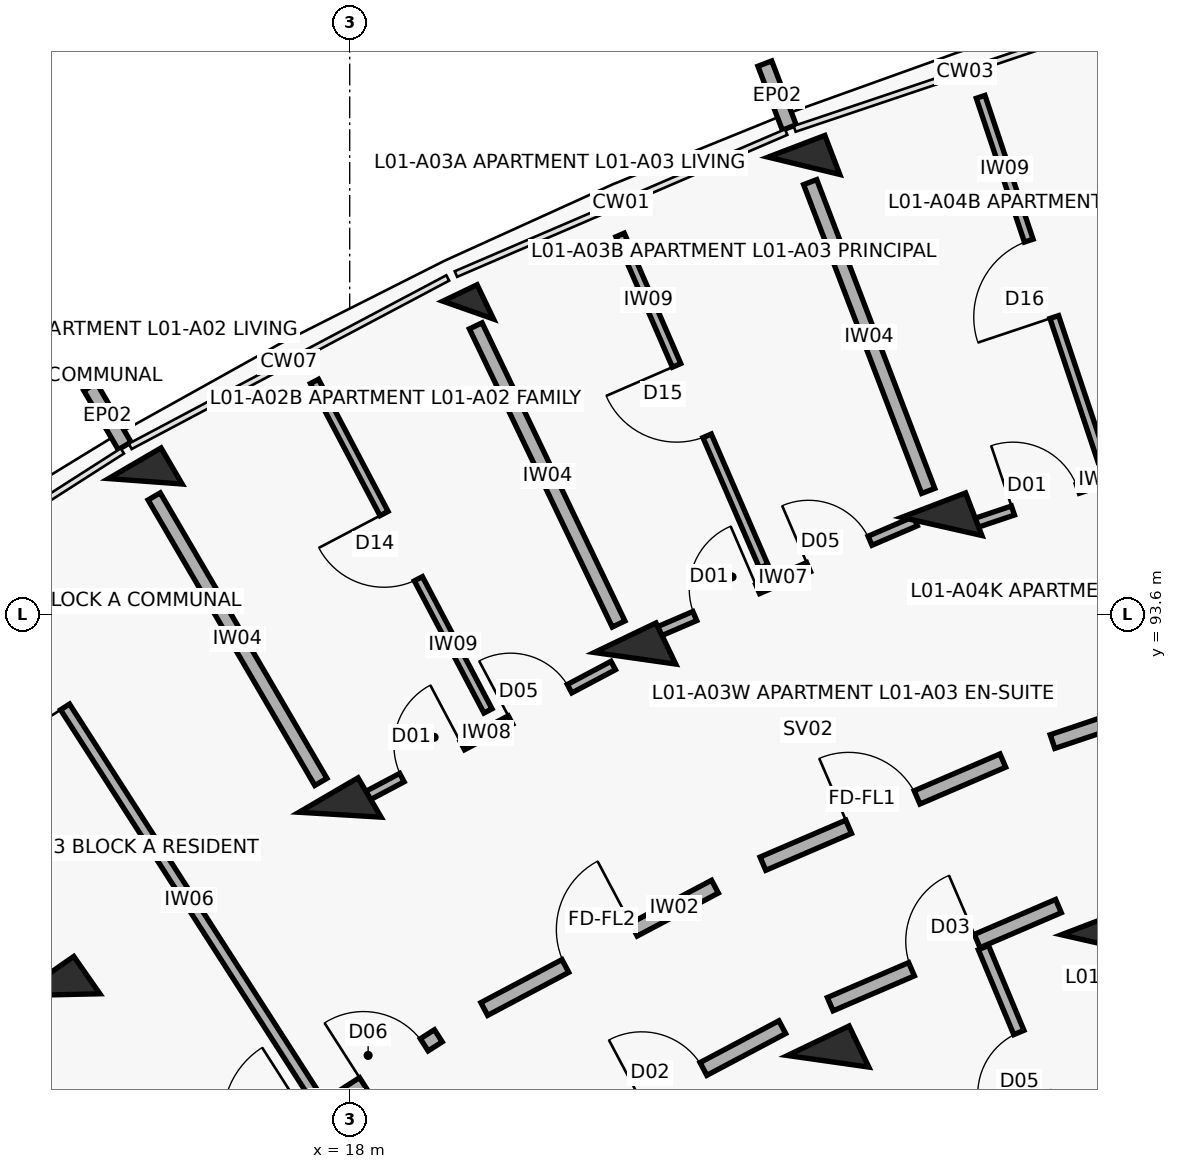
"""IFC4 building model, lengths in metres.
Left out: names, types, materials, properties, quantities, classifications, styles, units other than length and angle.
Written with IfcOpenShell. Run it as: python <this file> out.ifc"""

import sys

from ifc_helpers import new_model, si_unit, direction, frame, frame_2d, origin, origin_2d, place, context, subcontext, project, spatial, rectangle, extrude, element, fill, save


model = new_model("IFC4")
c1 = context("Model", 3, precision=1e-05, world=origin(), true_north=direction((0.0, 1.0)))
c2 = subcontext(c1, "Body", "Model", "MODEL_VIEW")
j1 = project(units=[si_unit("LENGTHUNIT", "METRE"), si_unit("PLANEANGLEUNIT", "RADIAN")], contexts=[c1])
p1 = place(None, origin())
s1 = spatial("IfcSite", under=j1, at=p1, CompositionType="ELEMENT")
p2 = place(p1, origin())
s2 = spatial("IfcBuilding", under=s1, at=p2, CompositionType="ELEMENT")
p3 = place(p2, frame((0.0, 0.0, 4.5)))
s3 = spatial("IfcBuildingStorey", under=s2, at=p3, CompositionType="ELEMENT", Elevation=4.5)
for number, where, z_axis, x_axis in (
    (1, (14.172, 88.592, 0.0), (0.0, 0.0, 1.0), (-0.573, 0.82, 0.0)),
    (2, (17.873, 90.96, 0.0), (0.0, 0.0, 1.0), (-0.504, 0.864, 0.0)),
):
    element("IfcColumn", number, at=place(p3, frame(where, z_axis=z_axis, x_axis=x_axis)), inside=s3, PredefinedType="COLUMN", context=c2, shape_type="SweptSolid", body=[
        extrude(rectangle(XDim=0.6, YDim=0.9, at=origin_2d()), origin(), (0.0, 0.0, 1.0), 3.6),
    ])
p4 = place(p3, frame((15.311, 95.347, 0.0), z_axis=(0.0, 0.0, 1.0), x_axis=(-0.504226211181, 0.863571611366, 0.0)))
e3 = element("IfcColumn", 3, at=p4, inside=s3, PredefinedType="COLUMN", context=c2, shape_type="SweptSolid", body=[
    extrude(rectangle(XDim=0.55, YDim=0.8, at=origin_2d()), origin(), (0.0, 0.0, 1.0), 3.6),
])
for number, where, z_axis, x_axis in (
    (4, (24.294, 87.716, 0.0), (0.0, 0.0, 1.0), (-0.432, 0.902, 0.0)),
    (5, (21.754, 93.019, 0.0), (0.0, 0.0, 1.0), (-0.432, 0.902, 0.0)),
):
    element("IfcColumn", number, at=place(p3, frame(where, z_axis=z_axis, x_axis=x_axis)), inside=s3, PredefinedType="COLUMN", context=c2, shape_type="SweptSolid", body=[
        extrude(rectangle(XDim=0.6, YDim=0.9, at=origin_2d()), origin(), (0.0, 0.0, 1.0), 3.6),
    ])
p5 = place(p3, frame((19.559, 97.6, 0.0), z_axis=(0.0, 0.0, 1.0), x_axis=(-0.432085748802, 0.901832526405, 0.0)))
e6 = element("IfcColumn", 6, at=p5, inside=s3, PredefinedType="COLUMN", context=c2, shape_type="SweptSolid", body=[
    extrude(rectangle(XDim=0.5, YDim=0.5, at=origin_2d()), origin(), (0.0, 0.0, 1.0), 3.6),
])
for number, where, z_axis, x_axis in (
    (7, (27.889, 89.261, 0.0), (0.0, 0.0, 1.0), (-0.357, 0.934, 0.0)),
    (8, (25.79, 94.753, 0.0), (0.0, 0.0, 1.0), (-0.357, 0.934, 0.0)),
):
    element("IfcColumn", number, at=place(p3, frame(where, z_axis=z_axis, x_axis=x_axis)), inside=s3, PredefinedType="COLUMN", context=c2, shape_type="SweptSolid", body=[
        extrude(rectangle(XDim=0.6, YDim=0.9, at=origin_2d()), origin(), (0.0, 0.0, 1.0), 3.6),
    ])
p6 = place(p3, frame((23.976, 99.499, 0.0), z_axis=(0.0, 0.0, 1.0), x_axis=(-0.357064076459, 0.934079892355, 0.0)))
e9 = element("IfcColumn", 9, at=p6, inside=s3, PredefinedType="COLUMN", context=c2, shape_type="SweptSolid", body=[
    extrude(rectangle(XDim=0.55, YDim=0.8, at=origin_2d()), origin(), (0.0, 0.0, 1.0), 3.6),
])
p7 = place(p3, frame((15.039, 95.813, 0.0), z_axis=(0.0, 0.0, 1.0), x_axis=(-0.504326383773, 0.863513114336, 0.0)))
e10 = element("IfcWall", 10, at=p7, inside=s3, PredefinedType="PARAPET", context=c2, shape_type="SweptSolid", body=[
    extrude(rectangle(XDim=0.9, YDim=0.195, at=frame_2d((0.45, 0.0))), origin(), (0.0, 0.0, 1.0), 2.6),
])
p8 = place(p3, frame((23.783, 100.003, 0.0), z_axis=(0.0, 0.0, 1.0), x_axis=(-0.356942580168, 0.934126326823, 0.0)))
e11 = element("IfcWall", 11, at=p8, inside=s3, PredefinedType="PARAPET", context=c2, shape_type="SweptSolid", body=[
    extrude(rectangle(XDim=0.9, YDim=0.195, at=frame_2d((0.45, 0.0))), origin(), (0.0, 0.0, 1.0), 2.6),
])
p9 = place(p3, frame((16.272, 86.199, 0.0), z_axis=(0.0, 0.0, 1.0), x_axis=(0.842257205985, 0.539075874963, 0.0)))
e12 = element("IfcWall", 12, at=p9, inside=s3, PredefinedType="SOLIDWALL", context=c2, shape_type="SweptSolid", body=[
    extrude(rectangle(XDim=3.436, YDim=0.19, at=frame_2d((1.718, 0.0))), origin(), (0.0, 0.0, 1.0), 2.58),
])
p10 = place(p9, frame((0.28, 0.0, 0.0)))
e13 = element("IfcOpeningElement", 13, at=p10, cuts=e12, PredefinedType="OPENING", context=c2, shape_type="SweptSolid", body=[
    extrude(rectangle(XDim=1.12, YDim=2.15, at=frame_2d((0.56, 1.075))), frame((0.0, 0.105, 0.0), z_axis=(0.0, -1.0, 0.0), x_axis=(1.0, 0.0, 0.0)), (0.0, 0.0, 1.0), 0.21),
])
p11 = place(p9, frame((2.266, 0.0, 0.0)))
e14 = element("IfcOpeningElement", 14, at=p11, cuts=e12, PredefinedType="OPENING", context=c2, shape_type="SweptSolid", body=[
    extrude(rectangle(XDim=0.95, YDim=2.1, at=frame_2d((0.475, 1.05))), frame((0.0, 0.105, 0.0), z_axis=(0.0, -1.0, 0.0), x_axis=(1.0, 0.0, 0.0)), (0.0, 0.0, 1.0), 0.21),
])
p12 = place(p3, frame((17.524, 87.288, 0.0), z_axis=(0.0, 0.0, 1.0), x_axis=(-0.540338452216, 0.841447774408, 0.0)))
e15 = element("IfcWall", 15, at=p12, inside=s3, PredefinedType="PARTITIONING", context=c2, shape_type="SweptSolid", body=[
    extrude(rectangle(XDim=7.95, YDim=0.14, at=frame_2d((3.975, 0.0))), origin(), (0.0, 0.0, 1.0), 2.58),
])
p13 = place(p12, frame((6.05, 0.0, 0.0)))
e16 = element("IfcOpeningElement", 16, at=p13, cuts=e15, PredefinedType="OPENING", context=c2, shape_type="SweptSolid", body=[
    extrude(rectangle(XDim=0.92, YDim=2.1, at=frame_2d((0.46, 1.05))), frame((0.0, 0.08, 0.0), z_axis=(0.0, -1.0, 0.0), x_axis=(1.0, 0.0, 0.0)), (0.0, 0.0, 1.0), 0.16),
])
p14 = place(p3, frame((19.77, 88.404, 0.0), z_axis=(0.0, 0.0, 1.0), x_axis=(0.883410853063, 0.468599258099, 0.0)))
e17 = element("IfcWall", 17, at=p14, inside=s3, PredefinedType="SOLIDWALL", context=c2, shape_type="SweptSolid", body=[
    extrude(rectangle(XDim=3.436, YDim=0.19, at=frame_2d((1.718, 0.0))), origin(), (0.0, 0.0, 1.0), 2.58),
])
p15 = place(p14, frame((1.208, 0.0, 0.0)))
e18 = element("IfcOpeningElement", 18, at=p15, cuts=e17, PredefinedType="OPENING", context=c2, shape_type="SweptSolid", body=[
    extrude(rectangle(XDim=1.02, YDim=2.15, at=frame_2d((0.51, 1.075))), frame((0.0, 0.105, 0.0), z_axis=(0.0, -1.0, 0.0), x_axis=(1.0, 0.0, 0.0)), (0.0, 0.0, 1.0), 0.21),
])
p16 = place(p3, frame((20.804, 86.634, 0.0), z_axis=(0.0, 0.0, 1.0), x_axis=(0.883444301944, 0.468536194293, 0.0)))
e19 = element("IfcWall", 19, at=p16, inside=s3, PredefinedType="SOLIDWALL", context=c2, shape_type="SweptSolid", body=[
    extrude(rectangle(XDim=3.269, YDim=0.19, at=frame_2d((1.634, 0.0))), origin(), (0.0, 0.0, 1.0), 2.58),
])
p17 = place(p16, frame((1.174, 0.0, 0.0)))
e20 = element("IfcOpeningElement", 20, at=p17, cuts=e19, PredefinedType="OPENING", context=c2, shape_type="SweptSolid", body=[
    extrude(rectangle(XDim=0.92, YDim=2.1, at=frame_2d((0.46, 1.05))), frame((0.0, 0.105, 0.0), z_axis=(0.0, -1.0, 0.0), x_axis=(1.0, 0.0, 0.0)), (0.0, 0.0, 1.0), 0.21),
])
p18 = place(p3, frame((18.113, 91.144, 0.0), z_axis=(0.0, 0.0, 1.0), x_axis=(0.88341855112, 0.46858474531, 0.0)))
e21 = element("IfcWall", 21, at=p18, inside=s3, PredefinedType="PARTITIONING", context=c2, shape_type="SweptSolid", body=[
    extrude(rectangle(XDim=3.797, YDim=0.125, at=frame_2d((1.898, 0.0))), origin(), (0.0, 0.0, 1.0), 2.58),
])
p19 = place(p18, frame((0.65, 0.0, 0.0)))
e22 = element("IfcOpeningElement", 22, at=p19, cuts=e21, PredefinedType="OPENING", context=c2, shape_type="SweptSolid", body=[
    extrude(rectangle(XDim=0.9, YDim=2.1, at=frame_2d((0.45, 1.05))), frame((0.0, 0.073, 0.0), z_axis=(0.0, -1.0, 0.0), x_axis=(1.0, 0.0, 0.0)), (0.0, 0.0, 1.0), 0.145),
])
p20 = place(p18, frame((2.267, 0.0, 0.0)))
e23 = element("IfcOpeningElement", 23, at=p20, cuts=e21, PredefinedType="OPENING", context=c2, shape_type="SweptSolid", body=[
    extrude(rectangle(XDim=0.88, YDim=2.1, at=frame_2d((0.44, 1.05))), frame((0.0, 0.073, 0.0), z_axis=(0.0, -1.0, 0.0), x_axis=(1.0, 0.0, 0.0)), (0.0, 0.0, 1.0), 0.145),
])
p21 = place(p3, frame((19.819, 92.326, 0.0), z_axis=(0.0, 0.0, 1.0), x_axis=(-0.465849102717, 0.884864177995, 0.0)))
e24 = element("IfcWall", 24, at=p21, inside=s3, PredefinedType="PARTITIONING", context=c2, shape_type="SweptSolid", body=[
    extrude(rectangle(XDim=4.9, YDim=0.12, at=frame_2d((2.45, 0.0))), origin(), (0.0, 0.0, 1.0), 2.58),
])
p22 = place(p21, frame((1.965, 0.0, 0.0)))
e25 = element("IfcOpeningElement", 25, at=p22, cuts=e24, PredefinedType="OPENING", context=c2, shape_type="SweptSolid", body=[
    extrude(rectangle(XDim=0.97, YDim=2.1, at=frame_2d((0.485, 1.05))), frame((0.0, 0.07, 0.0), z_axis=(0.0, -1.0, 0.0), x_axis=(1.0, 0.0, 0.0)), (0.0, 0.0, 1.0), 0.14),
])
p23 = place(p3, frame((17.621, 91.392, 0.0), z_axis=(0.0, 0.0, 1.0), x_axis=(-0.504216452091, 0.863577309475, 0.0)))
e26 = element("IfcWall", 26, at=p23, inside=s3, PredefinedType="SOLIDWALL", context=c2, shape_type="SweptSolid", body=[
    extrude(rectangle(XDim=4.35, YDim=0.185, at=frame_2d((2.175, 0.0))), origin(), (0.0, 0.0, 1.0), 2.58),
])
p24 = place(p3, frame((23.437, 90.316, 0.0), z_axis=(0.0, 0.0, 1.0), x_axis=(0.918718172399, 0.394913813008, 0.0)))
e27 = element("IfcWall", 27, at=p24, inside=s3, PredefinedType="SOLIDWALL", context=c2, shape_type="SweptSolid", body=[
    extrude(rectangle(XDim=3.436, YDim=0.19, at=frame_2d((1.718, 0.0))), origin(), (0.0, 0.0, 1.0), 2.58),
])
p25 = place(p24, frame((1.228, 0.0, 0.0)))
e28 = element("IfcOpeningElement", 28, at=p25, cuts=e27, PredefinedType="OPENING", context=c2, shape_type="SweptSolid", body=[
    extrude(rectangle(XDim=0.98, YDim=2.15, at=frame_2d((0.49, 1.075))), frame((0.0, 0.105, 0.0), z_axis=(0.0, -1.0, 0.0), x_axis=(1.0, 0.0, 0.0)), (0.0, 0.0, 1.0), 0.21),
])
p26 = place(p3, frame((24.322, 88.467, 0.0), z_axis=(0.0, 0.0, 1.0), x_axis=(0.918723391052, 0.394901672235, 0.0)))
e29 = element("IfcWall", 29, at=p26, inside=s3, PredefinedType="SOLIDWALL", context=c2, shape_type="SweptSolid", body=[
    extrude(rectangle(XDim=3.269, YDim=0.19, at=frame_2d((1.634, 0.0))), origin(), (0.0, 0.0, 1.0), 2.58),
])
p27 = place(p26, frame((1.164, 0.0, 0.0)))
e30 = element("IfcOpeningElement", 30, at=p27, cuts=e29, PredefinedType="OPENING", context=c2, shape_type="SweptSolid", body=[
    extrude(rectangle(XDim=0.94, YDim=2.1, at=frame_2d((0.47, 1.05))), frame((0.0, 0.105, 0.0), z_axis=(0.0, -1.0, 0.0), x_axis=(1.0, 0.0, 0.0)), (0.0, 0.0, 1.0), 0.21),
])
p28 = place(p3, frame((27.609, 86.166, 0.0), z_axis=(0.0, 0.0, 1.0), x_axis=(-0.385151143297, 0.922853507777, 0.0)))
e31 = element("IfcWall", 31, at=p28, inside=s3, PredefinedType="PARTITIONING", context=c2, shape_type="SweptSolid", body=[
    extrude(rectangle(XDim=3.3, YDim=0.145, at=frame_2d((1.65, 0.0))), origin(), (0.0, 0.0, 1.0), 2.58),
])
p29 = place(p28, frame((1.21, 0.0, 0.0)))
e32 = element("IfcOpeningElement", 32, at=p29, cuts=e31, PredefinedType="OPENING", context=c2, shape_type="SweptSolid", body=[
    extrude(rectangle(XDim=0.88, YDim=2.1, at=frame_2d((0.44, 1.05))), frame((0.0, 0.083, 0.0), z_axis=(0.0, -1.0, 0.0), x_axis=(1.0, 0.0, 0.0)), (0.0, 0.0, 1.0), 0.165),
])
p30 = place(p3, frame((21.943, 93.317, 0.0), z_axis=(0.0, 0.0, 1.0), x_axis=(0.918726854017, 0.394893615684, 0.0)))
e33 = element("IfcWall", 33, at=p30, inside=s3, PredefinedType="PARTITIONING", context=c2, shape_type="SweptSolid", body=[
    extrude(rectangle(XDim=3.81, YDim=0.13, at=frame_2d((1.905, 0.0))), origin(), (0.0, 0.0, 1.0), 2.58),
])
p31 = place(p30, frame((0.65, 0.0, 0.0)))
e34 = element("IfcOpeningElement", 34, at=p31, cuts=e33, PredefinedType="OPENING", context=c2, shape_type="SweptSolid", body=[
    extrude(rectangle(XDim=0.9, YDim=2.1, at=frame_2d((0.45, 1.05))), frame((0.0, 0.075, 0.0), z_axis=(0.0, -1.0, 0.0), x_axis=(1.0, 0.0, 0.0)), (0.0, 0.0, 1.0), 0.15),
])
p32 = place(p30, frame((2.28, 0.0, 0.0)))
e35 = element("IfcOpeningElement", 35, at=p32, cuts=e33, PredefinedType="OPENING", context=c2, shape_type="SweptSolid", body=[
    extrude(rectangle(XDim=0.88, YDim=2.1, at=frame_2d((0.44, 1.05))), frame((0.0, 0.075, 0.0), z_axis=(0.0, -1.0, 0.0), x_axis=(1.0, 0.0, 0.0)), (0.0, 0.0, 1.0), 0.15),
])
p33 = place(p3, frame((23.446, 94.23, 0.0), z_axis=(0.0, 0.0, 1.0), x_axis=(-0.3976752315, 0.917526244993, 0.0)))
e36 = element("IfcWall", 36, at=p33, inside=s3, PredefinedType="PARTITIONING", context=c2, shape_type="SweptSolid", body=[
    extrude(rectangle(XDim=4.75, YDim=0.12, at=frame_2d((2.375, 0.0))), origin(), (0.0, 0.0, 1.0), 2.58),
])
p34 = place(p33, frame((1.87, 0.0, 0.0)))
e37 = element("IfcOpeningElement", 37, at=p34, cuts=e36, PredefinedType="OPENING", context=c2, shape_type="SweptSolid", body=[
    extrude(rectangle(XDim=1.01, YDim=2.1, at=frame_2d((0.505, 1.05))), frame((0.0, 0.07, 0.0), z_axis=(0.0, -1.0, 0.0), x_axis=(1.0, 0.0, 0.0)), (0.0, 0.0, 1.0), 0.14),
])
p35 = place(p3, frame((21.538, 93.469, 0.0), z_axis=(0.0, 0.0, 1.0), x_axis=(-0.432086898897, 0.901831975371, 0.0)))
e38 = element("IfcWall", 38, at=p35, inside=s3, PredefinedType="SOLIDWALL", context=c2, shape_type="SweptSolid", body=[
    extrude(rectangle(XDim=4.35, YDim=0.185, at=frame_2d((2.175, 0.0))), origin(), (0.0, 0.0, 1.0), 2.58),
])
p36 = place(p3, frame((27.247, 91.923, 0.0), z_axis=(0.0, 0.0, 1.0), x_axis=(0.947863007629, 0.318678080151, 0.0)))
e39 = element("IfcWall", 39, at=p36, inside=s3, PredefinedType="SOLIDWALL", context=c2, shape_type="SweptSolid", body=[
    extrude(rectangle(XDim=3.436, YDim=0.19, at=frame_2d((1.718, 0.0))), origin(), (0.0, 0.0, 1.0), 2.58),
])
p37 = place(p36, frame((1.208, 0.0, 0.0)))
e40 = element("IfcOpeningElement", 40, at=p37, cuts=e39, PredefinedType="OPENING", context=c2, shape_type="SweptSolid", body=[
    extrude(rectangle(XDim=1.02, YDim=2.15, at=frame_2d((0.51, 1.075))), frame((0.0, 0.105, 0.0), z_axis=(0.0, -1.0, 0.0), x_axis=(1.0, 0.0, 0.0)), (0.0, 0.0, 1.0), 0.21),
])
p38 = place(p3, frame((26.11, 94.756, 0.0), z_axis=(0.0, 0.0, 1.0), x_axis=(0.947873924847, 0.318645606584, 0.0)))
e41 = element("IfcWall", 41, at=p38, inside=s3, PredefinedType="PARTITIONING", context=c2, shape_type="SweptSolid", body=[
    extrude(rectangle(XDim=3.785, YDim=0.125, at=frame_2d((1.893, 0.0))), origin(), (0.0, 0.0, 1.0), 2.58),
])
p39 = place(p38, frame((0.65, 0.0, 0.0)))
e42 = element("IfcOpeningElement", 42, at=p39, cuts=e41, PredefinedType="OPENING", context=c2, shape_type="SweptSolid", body=[
    extrude(rectangle(XDim=0.9, YDim=2.1, at=frame_2d((0.45, 1.05))), frame((0.0, 0.073, 0.0), z_axis=(0.0, -1.0, 0.0), x_axis=(1.0, 0.0, 0.0)), (0.0, 0.0, 1.0), 0.145),
])
p40 = place(p38, frame((2.255, 0.0, 0.0)))
e43 = element("IfcOpeningElement", 43, at=p40, cuts=e41, PredefinedType="OPENING", context=c2, shape_type="SweptSolid", body=[
    extrude(rectangle(XDim=0.88, YDim=2.1, at=frame_2d((0.44, 1.05))), frame((0.0, 0.073, 0.0), z_axis=(0.0, -1.0, 0.0), x_axis=(1.0, 0.0, 0.0)), (0.0, 0.0, 1.0), 0.145),
])
p41 = place(p3, frame((27.903, 95.616, 0.0), z_axis=(0.0, 0.0, 1.0), x_axis=(-0.31722829501, 0.948349201953, 0.0)))
e44 = element("IfcWall", 44, at=p41, inside=s3, PredefinedType="PARTITIONING", context=c2, shape_type="SweptSolid", body=[
    extrude(rectangle(XDim=5.05, YDim=0.12, at=frame_2d((2.525, 0.0))), origin(), (0.0, 0.0, 1.0), 2.58),
])
p42 = place(p41, frame((1.995, 0.0, 0.0)))
e45 = element("IfcOpeningElement", 45, at=p42, cuts=e44, PredefinedType="OPENING", context=c2, shape_type="SweptSolid", body=[
    extrude(rectangle(XDim=1.06, YDim=2.1, at=frame_2d((0.53, 1.05))), frame((0.0, 0.07, 0.0), z_axis=(0.0, -1.0, 0.0), x_axis=(1.0, 0.0, 0.0)), (0.0, 0.0, 1.0), 0.14),
])
p43 = place(p3, frame((25.611, 95.22, 0.0), z_axis=(0.0, 0.0, 1.0), x_axis=(-0.357064016205, 0.934079915388, 0.0)))
e46 = element("IfcWall", 46, at=p43, inside=s3, PredefinedType="SOLIDWALL", context=c2, shape_type="SweptSolid", body=[
    extrude(rectangle(XDim=4.35, YDim=0.185, at=frame_2d((2.175, 0.0))), origin(), (0.0, 0.0, 1.0), 2.58),
])
p44 = place(p11, origin())
e47 = element("IfcDoor", 47, at=p44, inside=s3, OperationType="SINGLE_SWING_LEFT", PredefinedType="DOOR", context=c2, shape_type="SweptSolid", body=[
    extrude(rectangle(XDim=0.95, YDim=2.1, at=frame_2d((0.475, 1.05))), frame((0.0, 0.025, 0.0), z_axis=(0.0, -1.0, 0.0), x_axis=(1.0, 0.0, 0.0)), (0.0, 0.0, 1.0), 0.05),
])
fill(e14, e47)
p45 = place(p13, origin())
e48 = element("IfcDoor", 48, at=p45, inside=s3, OperationType="SINGLE_SWING_LEFT", PredefinedType="DOOR", context=c2, shape_type="SweptSolid", body=[
    extrude(rectangle(XDim=0.92, YDim=2.1, at=frame_2d((0.46, 1.05))), frame((0.0, 0.025, 0.0), z_axis=(0.0, -1.0, 0.0), x_axis=(1.0, 0.0, 0.0)), (0.0, 0.0, 1.0), 0.05),
])
fill(e16, e48)
p46 = place(p15, origin())
e49 = element("IfcDoor", 49, at=p46, inside=s3, OperationType="SINGLE_SWING_RIGHT", PredefinedType="DOOR", context=c2, shape_type="SweptSolid", body=[
    extrude(rectangle(XDim=1.02, YDim=2.15, at=frame_2d((0.51, 1.075))), frame((0.0, 0.025, 0.0), z_axis=(0.0, -1.0, 0.0), x_axis=(1.0, 0.0, 0.0)), (0.0, 0.0, 1.0), 0.05),
])
fill(e18, e49)
p47 = place(p17, origin())
e50 = element("IfcDoor", 50, at=p47, inside=s3, OperationType="SINGLE_SWING_LEFT", PredefinedType="DOOR", context=c2, shape_type="SweptSolid", body=[
    extrude(rectangle(XDim=0.92, YDim=2.1, at=frame_2d((0.46, 1.05))), frame((0.0, 0.025, 0.0), z_axis=(0.0, -1.0, 0.0), x_axis=(1.0, 0.0, 0.0)), (0.0, 0.0, 1.0), 0.05),
])
fill(e20, e50)
p48 = place(p19, origin())
e51 = element("IfcDoor", 51, at=p48, inside=s3, OperationType="SINGLE_SWING_RIGHT", PredefinedType="DOOR", context=c2, shape_type="SweptSolid", body=[
    extrude(rectangle(XDim=0.9, YDim=2.1, at=frame_2d((0.45, 1.05))), frame((0.0, 0.025, 0.0), z_axis=(0.0, -1.0, 0.0), x_axis=(1.0, 0.0, 0.0)), (0.0, 0.0, 1.0), 0.05),
])
fill(e22, e51)
p49 = place(p20, origin())
e52 = element("IfcDoor", 52, at=p49, inside=s3, OperationType="SINGLE_SWING_LEFT", PredefinedType="DOOR", context=c2, shape_type="SweptSolid", body=[
    extrude(rectangle(XDim=0.88, YDim=2.1, at=frame_2d((0.44, 1.05))), frame((0.0, 0.025, 0.0), z_axis=(0.0, -1.0, 0.0), x_axis=(1.0, 0.0, 0.0)), (0.0, 0.0, 1.0), 0.05),
])
fill(e23, e52)
p50 = place(p22, origin())
e53 = element("IfcDoor", 53, at=p50, inside=s3, OperationType="SINGLE_SWING_RIGHT", PredefinedType="DOOR", context=c2, shape_type="SweptSolid", body=[
    extrude(rectangle(XDim=0.97, YDim=2.1, at=frame_2d((0.485, 1.05))), frame((0.0, 0.025, 0.0), z_axis=(0.0, -1.0, 0.0), x_axis=(1.0, 0.0, 0.0)), (0.0, 0.0, 1.0), 0.05),
])
fill(e25, e53)
p51 = place(p25, origin())
e54 = element("IfcDoor", 54, at=p51, inside=s3, OperationType="SINGLE_SWING_LEFT", PredefinedType="DOOR", context=c2, shape_type="SweptSolid", body=[
    extrude(rectangle(XDim=0.98, YDim=2.15, at=frame_2d((0.49, 1.075))), frame((0.0, 0.025, 0.0), z_axis=(0.0, -1.0, 0.0), x_axis=(1.0, 0.0, 0.0)), (0.0, 0.0, 1.0), 0.05),
])
fill(e28, e54)
p52 = place(p27, origin())
e55 = element("IfcDoor", 55, at=p52, inside=s3, OperationType="SINGLE_SWING_RIGHT", PredefinedType="DOOR", context=c2, shape_type="SweptSolid", body=[
    extrude(rectangle(XDim=0.94, YDim=2.1, at=frame_2d((0.47, 1.05))), frame((0.0, 0.025, 0.0), z_axis=(0.0, -1.0, 0.0), x_axis=(1.0, 0.0, 0.0)), (0.0, 0.0, 1.0), 0.05),
])
fill(e30, e55)
p53 = place(p29, origin())
e56 = element("IfcDoor", 56, at=p53, inside=s3, OperationType="SINGLE_SWING_LEFT", PredefinedType="DOOR", context=c2, shape_type="SweptSolid", body=[
    extrude(rectangle(XDim=0.88, YDim=2.1, at=frame_2d((0.44, 1.05))), frame((0.0, 0.025, 0.0), z_axis=(0.0, -1.0, 0.0), x_axis=(1.0, 0.0, 0.0)), (0.0, 0.0, 1.0), 0.05),
])
fill(e32, e56)
p54 = place(p31, origin())
e57 = element("IfcDoor", 57, at=p54, inside=s3, OperationType="SINGLE_SWING_RIGHT", PredefinedType="DOOR", context=c2, shape_type="SweptSolid", body=[
    extrude(rectangle(XDim=0.9, YDim=2.1, at=frame_2d((0.45, 1.05))), frame((0.0, 0.025, 0.0), z_axis=(0.0, -1.0, 0.0), x_axis=(1.0, 0.0, 0.0)), (0.0, 0.0, 1.0), 0.05),
])
fill(e34, e57)
p55 = place(p32, origin())
e58 = element("IfcDoor", 58, at=p55, inside=s3, OperationType="SINGLE_SWING_LEFT", PredefinedType="DOOR", context=c2, shape_type="SweptSolid", body=[
    extrude(rectangle(XDim=0.88, YDim=2.1, at=frame_2d((0.44, 1.05))), frame((0.0, 0.025, 0.0), z_axis=(0.0, -1.0, 0.0), x_axis=(1.0, 0.0, 0.0)), (0.0, 0.0, 1.0), 0.05),
])
fill(e35, e58)
p56 = place(p34, origin())
e59 = element("IfcDoor", 59, at=p56, inside=s3, OperationType="SINGLE_SWING_RIGHT", PredefinedType="DOOR", context=c2, shape_type="SweptSolid", body=[
    extrude(rectangle(XDim=1.01, YDim=2.1, at=frame_2d((0.505, 1.05))), frame((0.0, 0.025, 0.0), z_axis=(0.0, -1.0, 0.0), x_axis=(1.0, 0.0, 0.0)), (0.0, 0.0, 1.0), 0.05),
])
fill(e37, e59)
p57 = place(p39, origin())
e60 = element("IfcDoor", 60, at=p57, inside=s3, OperationType="SINGLE_SWING_LEFT", PredefinedType="DOOR", context=c2, shape_type="SweptSolid", body=[
    extrude(rectangle(XDim=0.9, YDim=2.1, at=frame_2d((0.45, 1.05))), frame((0.0, 0.025, 0.0), z_axis=(0.0, -1.0, 0.0), x_axis=(1.0, 0.0, 0.0)), (0.0, 0.0, 1.0), 0.05),
])
fill(e42, e60)
p58 = place(p42, origin())
e61 = element("IfcDoor", 61, at=p58, inside=s3, OperationType="SINGLE_SWING_LEFT", PredefinedType="DOOR", context=c2, shape_type="SweptSolid", body=[
    extrude(rectangle(XDim=1.06, YDim=2.1, at=frame_2d((0.53, 1.05))), frame((0.0, 0.025, 0.0), z_axis=(0.0, -1.0, 0.0), x_axis=(1.0, 0.0, 0.0)), (0.0, 0.0, 1.0), 0.05),
])
fill(e45, e61)
save(model, sys.argv[1])
